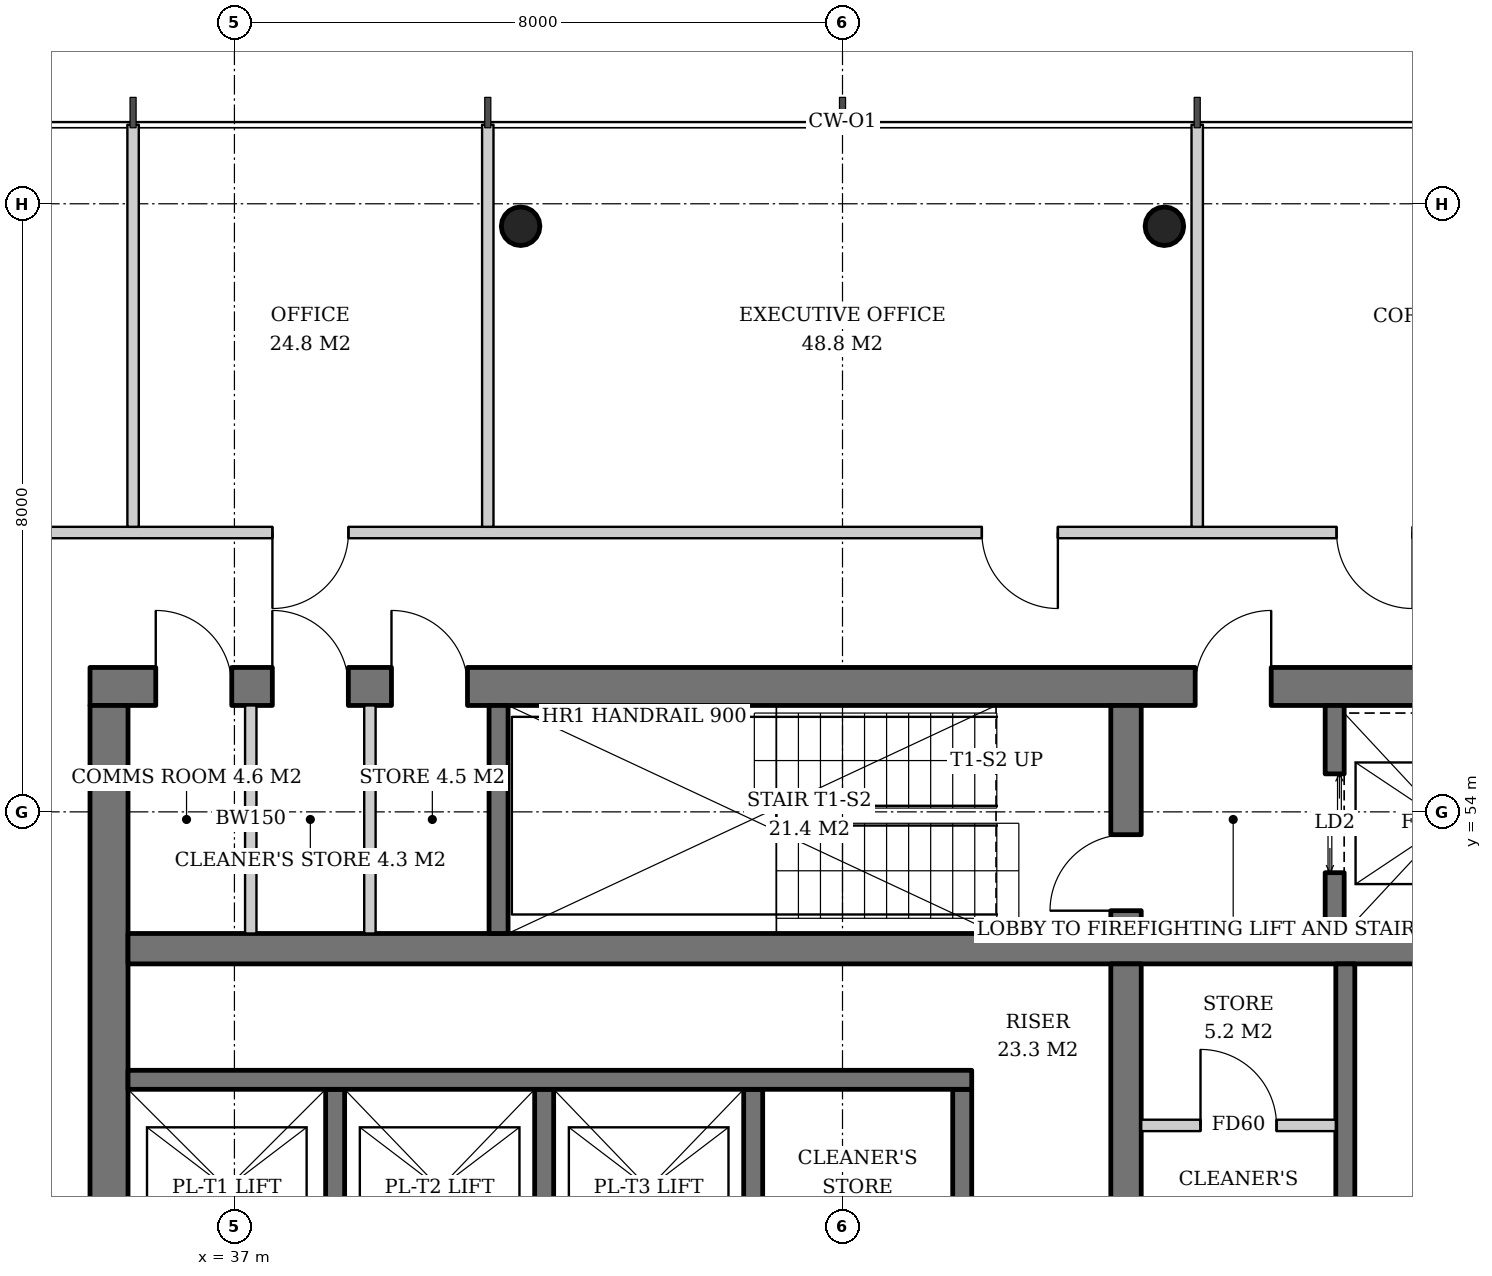
"""IFC4 building model, lengths in metres.
Left out: names, types, materials, properties, quantities, classifications, styles, units other than length and angle.
Written with IfcOpenShell. Run it as: python <this file> out.ifc"""

import sys

from ifc_helpers import new_model, si_unit, direction, frame, frame_2d, origin, origin_2d, place, context, subcontext, project, spatial, rectangle, hollow_circle, extrude, element, fill, save


model = new_model("IFC4")
c1 = context("Model", 3, precision=1e-05, world=origin(), true_north=direction((0.0, 1.0)))
c2 = subcontext(c1, "Body", "Model", "MODEL_VIEW")
j1 = project(units=[si_unit("LENGTHUNIT", "METRE"), si_unit("PLANEANGLEUNIT", "RADIAN")], contexts=[c1])
p1 = place(None, origin())
s1 = spatial("IfcSite", under=j1, at=p1, CompositionType="ELEMENT")
p2 = place(p1, origin())
s2 = spatial("IfcBuilding", under=s1, at=p2, CompositionType="ELEMENT")
p3 = place(p2, frame((0.0, 0.0, 279.4)))
s3 = spatial("IfcBuildingStorey", under=s2, at=p3, CompositionType="ELEMENT", Elevation=279.4)
for number, where, z_axis, x_axis in (
    (1, (49.248, 61.743, 0.0), (-0.011, -0.032, 0.999), (0.949, -0.316, 0.0)),
    (2, (40.752, 61.743, 0.0), (0.011, -0.032, 0.999), (0.949, 0.316, 0.0)),
):
    element("IfcColumn", number, at=place(p3, frame(where, z_axis=z_axis, x_axis=x_axis)), inside=s3, PredefinedType="COLUMN", context=c2, shape_type="SweptSolid", body=[
        extrude(hollow_circle(Radius=0.254, WallThickness=0.02, at=origin_2d()), origin(), (0.0, 0.0, 1.0), 3.802),
    ])
p4 = place(p3, frame((35.1, 55.65, 0.0), z_axis=(0.0, 0.0, 1.0), x_axis=(1.0, 0.0, 0.0)))
e3 = element("IfcWall", 3, at=p4, inside=s3, PredefinedType="SHEAR", context=c2, shape_type="SweptSolid", body=[
    extrude(rectangle(XDim=19.8, YDim=0.5, at=frame_2d((9.9, 0.0))), origin(), (0.0, 0.0, 1.0), 3.8),
])
p5 = place(p4, frame((14.54, 0.0, 0.0)))
e4 = element("IfcOpeningElement", 4, at=p5, cuts=e3, PredefinedType="OPENING", context=c2, shape_type="SweptSolid", body=[
    extrude(rectangle(XDim=1.0, YDim=2.1, at=frame_2d((0.5, 1.05))), frame((0.0, 0.26, 0.0), z_axis=(0.0, -1.0, 0.0), x_axis=(1.0, 0.0, 0.0)), (0.0, 0.0, 1.0), 0.52),
])
p6 = place(p4, frame((0.865, 0.0, 0.0)))
e5 = element("IfcOpeningElement", 5, at=p6, cuts=e3, PredefinedType="OPENING", context=c2, shape_type="SweptSolid", body=[
    extrude(rectangle(XDim=1.0, YDim=2.1, at=frame_2d((0.5, 1.05))), frame((0.0, 0.26, 0.0), z_axis=(0.0, -1.0, 0.0), x_axis=(1.0, 0.0, 0.0)), (0.0, 0.0, 1.0), 0.52),
])
p7 = place(p4, frame((2.399, 0.0, 0.0)))
e6 = element("IfcOpeningElement", 6, at=p7, cuts=e3, PredefinedType="OPENING", context=c2, shape_type="SweptSolid", body=[
    extrude(rectangle(XDim=1.0, YDim=2.1, at=frame_2d((0.5, 1.05))), frame((0.0, 0.26, 0.0), z_axis=(0.0, -1.0, 0.0), x_axis=(1.0, 0.0, 0.0)), (0.0, 0.0, 1.0), 0.52),
])
p8 = place(p4, frame((3.966, 0.0, 0.0)))
e7 = element("IfcOpeningElement", 7, at=p8, cuts=e3, PredefinedType="OPENING", context=c2, shape_type="SweptSolid", body=[
    extrude(rectangle(XDim=1.0, YDim=2.1, at=frame_2d((0.5, 1.05))), frame((0.0, 0.26, 0.0), z_axis=(0.0, -1.0, 0.0), x_axis=(1.0, 0.0, 0.0)), (0.0, 0.0, 1.0), 0.52),
])
p9 = place(p3, frame((35.35, 36.6, 0.0), z_axis=(0.0, 0.0, 1.0), x_axis=(0.0, 1.0, 0.0)))
e8 = element("IfcWall", 8, at=p9, inside=s3, PredefinedType="SHEAR", context=c2, shape_type="SweptSolid", body=[
    extrude(rectangle(XDim=18.8, YDim=0.5, at=frame_2d((9.4, 0.0))), origin(), (0.0, 0.0, 1.0), 3.8),
])
p10 = place(p9, frame((8.5, 0.0, 0.0)))
e9 = element("IfcOpeningElement", 9, at=p10, cuts=e8, PredefinedType="OPENING", context=c2, shape_type="SweptSolid", body=[
    extrude(rectangle(XDim=1.8, YDim=2.4, at=frame_2d((0.9, 1.2))), frame((0.0, 0.26, 0.0), z_axis=(0.0, -1.0, 0.0), x_axis=(1.0, 0.0, 0.0)), (0.0, 0.0, 1.0), 0.52),
])
p11 = place(p3, frame((35.6, 52.2, 0.0), z_axis=(0.0, 0.0, 1.0), x_axis=(1.0, 0.0, 0.0)))
e10 = element("IfcWall", 10, at=p11, inside=s3, PredefinedType="SHEAR", context=c2, shape_type="SweptSolid", body=[
    extrude(rectangle(XDim=18.8, YDim=0.4, at=frame_2d((9.4, 0.0))), origin(), (0.0, 0.0, 1.0), 3.8),
])
p12 = place(p3, frame((48.73, 40.0, 0.0), z_axis=(0.0, 0.0, 1.0), x_axis=(0.0, 1.0, 0.0)))
e11 = element("IfcWall", 11, at=p12, inside=s3, PredefinedType="SHEAR", context=c2, shape_type="SweptSolid", body=[
    extrude(rectangle(XDim=12.0, YDim=0.4, at=frame_2d((6.0, 0.0))), origin(), (0.0, 0.0, 1.0), 3.8),
])
p13 = place(p3, frame((48.73, 52.4, 0.0), z_axis=(0.0, 0.0, 1.0), x_axis=(0.0, 1.0, 0.0)))
e12 = element("IfcWall", 12, at=p13, inside=s3, PredefinedType="SHEAR", context=c2, shape_type="SweptSolid", body=[
    extrude(rectangle(XDim=3.0, YDim=0.4, at=frame_2d((1.5, 0.0))), origin(), (0.0, 0.0, 1.0), 3.8),
])
p14 = place(p13, frame((0.3, 0.0, 0.0)))
e13 = element("IfcOpeningElement", 13, at=p14, cuts=e12, PredefinedType="OPENING", context=c2, shape_type="SweptSolid", body=[
    extrude(rectangle(XDim=1.0, YDim=2.1, at=frame_2d((0.5, 1.05))), frame((0.0, 0.21, 0.0), z_axis=(0.0, -1.0, 0.0), x_axis=(1.0, 0.0, 0.0)), (0.0, 0.0, 1.0), 0.42),
])
p15 = place(p3, frame((40.475, 52.4, 0.0), z_axis=(0.0, 0.0, 1.0), x_axis=(0.0, 1.0, 0.0)))
e14 = element("IfcWall", 14, at=p15, inside=s3, PredefinedType="SHEAR", context=c2, shape_type="SweptSolid", body=[
    extrude(rectangle(XDim=3.0, YDim=0.25, at=frame_2d((1.5, 0.0))), origin(), (0.0, 0.0, 1.0), 3.8),
])
p16 = place(p3, frame((51.475, 52.4, 0.0), z_axis=(0.0, 0.0, 1.0), x_axis=(0.0, 1.0, 0.0)))
e15 = element("IfcWall", 15, at=p16, inside=s3, PredefinedType="SHEAR", context=c2, shape_type="SweptSolid", body=[
    extrude(rectangle(XDim=3.0, YDim=0.25, at=frame_2d((1.5, 0.0))), origin(), (0.0, 0.0, 1.0), 3.8),
])
p17 = place(p16, frame((0.8, 0.0, 0.0)))
e16 = element("IfcOpeningElement", 16, at=p17, cuts=e15, PredefinedType="OPENING", context=c2, shape_type="SweptSolid", body=[
    extrude(rectangle(XDim=1.3, YDim=2.2, at=frame_2d((0.65, 1.1))), frame((0.0, 0.135, 0.0), z_axis=(0.0, -1.0, 0.0), x_axis=(1.0, 0.0, 0.0)), (0.0, 0.0, 1.0), 0.27),
])
for number, where, z_axis, x_axis in (
    (17, (38.325, 47.75, 0.0), (0.0, 0.0, 1.0), (0.0, 1.0, 0.0)),
    (18, (41.075, 47.75, 0.0), (0.0, 0.0, 1.0), (0.0, 1.0, 0.0)),
    (19, (43.825, 47.75, 0.0), (0.0, 0.0, 1.0), (0.0, 1.0, 0.0)),
    (20, (46.575, 47.75, 0.0), (0.0, 0.0, 1.0), (0.0, 1.0, 0.0)),
):
    element("IfcWall", number, at=place(p3, frame(where, z_axis=z_axis, x_axis=x_axis)), inside=s3, PredefinedType="SHEAR", context=c2, shape_type="SweptSolid", body=[
        extrude(rectangle(XDim=2.6, YDim=0.25, at=frame_2d((1.3, 0.0))), origin(), (0.0, 0.0, 1.0), 3.8),
    ])
p18 = place(p3, frame((35.6, 50.475, 0.0), z_axis=(0.0, 0.0, 1.0), x_axis=(1.0, 0.0, 0.0)))
e21 = element("IfcWall", 21, at=p18, inside=s3, PredefinedType="SHEAR", context=c2, shape_type="SweptSolid", body=[
    extrude(rectangle(XDim=11.1, YDim=0.25, at=frame_2d((5.55, 0.0))), origin(), (0.0, 0.0, 1.0), 3.8),
])
p19 = place(p3, frame((51.615, 47.75, 0.0), z_axis=(0.0, 0.0, 1.0), x_axis=(0.0, 1.0, 0.0)))
e22 = element("IfcWall", 22, at=p19, inside=s3, PredefinedType="SHEAR", context=c2, shape_type="SweptSolid", body=[
    extrude(rectangle(XDim=4.25, YDim=0.25, at=frame_2d((2.125, 0.0))), origin(), (0.0, 0.0, 1.0), 3.8),
])
for number, where, z_axis, x_axis in (
    (23, (37.215, 52.4, 0.0), (0.0, 0.0, 1.0), (0.0, 1.0, 0.0)),
    (24, (38.782, 52.4, 0.0), (0.0, 0.0, 1.0), (0.0, 1.0, 0.0)),
):
    element("IfcWall", number, at=place(p3, frame(where, z_axis=z_axis, x_axis=x_axis)), inside=s3, PredefinedType="SOLIDWALL", context=c2, shape_type="SweptSolid", body=[
        extrude(rectangle(XDim=3.0, YDim=0.15, at=frame_2d((1.5, 0.0))), origin(), (0.0, 0.0, 1.0), 3.5),
    ])
p20 = place(p3, frame((48.93, 49.875, 0.0), z_axis=(0.0, 0.0, 1.0), x_axis=(1.0, 0.0, 0.0)))
e25 = element("IfcWall", 25, at=p20, inside=s3, PredefinedType="SOLIDWALL", context=c2, shape_type="SweptSolid", body=[
    extrude(rectangle(XDim=2.56, YDim=0.15, at=frame_2d((1.28, 0.0))), origin(), (0.0, 0.0, 1.0), 3.5),
])
p21 = place(p20, frame((0.78, 0.0, 0.0)))
e26 = element("IfcOpeningElement", 26, at=p21, cuts=e25, PredefinedType="OPENING", context=c2, shape_type="SweptSolid", body=[
    extrude(rectangle(XDim=1.0, YDim=2.1, at=frame_2d((0.5, 1.05))), frame((0.0, 0.085, 0.0), z_axis=(0.0, -1.0, 0.0), x_axis=(1.0, 0.0, 0.0)), (0.0, 0.0, 1.0), 0.17),
])
p22 = place(p3, frame((55.751, 57.675, 0.0), z_axis=(0.0, 0.0, 1.0), x_axis=(-1.0, 0.0, 0.0)))
e27 = element("IfcWall", 27, at=p22, inside=s3, PredefinedType="PARTITIONING", context=c2, shape_type="SweptSolid", body=[
    extrude(rectangle(XDim=21.503, YDim=0.15, at=frame_2d((10.751, 0.0))), origin(), (0.0, 0.0, 1.0), 2.747),
])
p23 = place(p22, frame((3.251, 0.0, 0.0)))
e28 = element("IfcOpeningElement", 28, at=p23, cuts=e27, PredefinedType="OPENING", context=c2, shape_type="SweptSolid", body=[
    extrude(rectangle(XDim=1.0, YDim=2.1, at=frame_2d((0.5, 1.05))), frame((0.0, 0.085, 0.0), z_axis=(0.0, -1.0, 0.0), x_axis=(1.0, 0.0, 0.0)), (0.0, 0.0, 1.0), 0.17),
])
p24 = place(p22, frame((7.918, 0.0, 0.0)))
e29 = element("IfcOpeningElement", 29, at=p24, cuts=e27, PredefinedType="OPENING", context=c2, shape_type="SweptSolid", body=[
    extrude(rectangle(XDim=1.0, YDim=2.1, at=frame_2d((0.5, 1.05))), frame((0.0, 0.085, 0.0), z_axis=(0.0, -1.0, 0.0), x_axis=(1.0, 0.0, 0.0)), (0.0, 0.0, 1.0), 0.17),
])
p25 = place(p22, frame((17.251, 0.0, 0.0)))
e30 = element("IfcOpeningElement", 30, at=p25, cuts=e27, PredefinedType="OPENING", context=c2, shape_type="SweptSolid", body=[
    extrude(rectangle(XDim=1.0, YDim=2.1, at=frame_2d((0.5, 1.05))), frame((0.0, 0.085, 0.0), z_axis=(0.0, -1.0, 0.0), x_axis=(1.0, 0.0, 0.0)), (0.0, 0.0, 1.0), 0.17),
])
for number, where, z_axis, x_axis in (
    (31, (49.667, 57.75, 0.0), (0.0, 0.0, 1.0), (0.0, 1.0, 0.0)),
    (32, (40.333, 57.75, 0.0), (0.0, 0.0, 1.0), (0.0, 1.0, 0.0)),
    (33, (35.667, 57.75, 0.0), (0.0, 0.0, 1.0), (0.0, 1.0, 0.0)),
):
    element("IfcWall", number, at=place(p3, frame(where, z_axis=z_axis, x_axis=x_axis)), inside=s3, PredefinedType="PARTITIONING", context=c2, shape_type="SweptSolid", body=[
        extrude(rectangle(XDim=5.29, YDim=0.15, at=frame_2d((2.645, 0.0))), origin(), (0.0, 0.0, 1.0), 3.0),
    ])
p26 = place(p17, origin())
e34 = element("IfcDoor", 34, at=p26, inside=s3, OperationType="DOUBLE_DOOR_SLIDING", PredefinedType="DOOR", context=c2, shape_type="SweptSolid", body=[
    extrude(rectangle(XDim=1.3, YDim=2.2, at=frame_2d((0.65, 1.1))), frame((0.0, 0.025, 0.0), z_axis=(0.0, -1.0, 0.0), x_axis=(1.0, 0.0, 0.0)), (0.0, 0.0, 1.0), 0.05),
])
fill(e16, e34)
p27 = place(p21, origin())
e35 = element("IfcDoor", 35, at=p27, inside=s3, OperationType="SINGLE_SWING_LEFT", PredefinedType="DOOR", context=c2, shape_type="SweptSolid", body=[
    extrude(rectangle(XDim=1.0, YDim=2.1, at=frame_2d((0.5, 1.05))), frame((0.0, 0.025, 0.0), z_axis=(0.0, -1.0, 0.0), x_axis=(1.0, 0.0, 0.0)), (0.0, 0.0, 1.0), 0.05),
])
fill(e26, e35)
p28 = place(p14, origin())
e36 = element("IfcDoor", 36, at=p28, inside=s3, OperationType="SINGLE_SWING_LEFT", PredefinedType="DOOR", context=c2, shape_type="SweptSolid", body=[
    extrude(rectangle(XDim=1.0, YDim=2.1, at=frame_2d((0.5, 1.05))), frame((0.0, 0.025, 0.0), z_axis=(0.0, -1.0, 0.0), x_axis=(1.0, 0.0, 0.0)), (0.0, 0.0, 1.0), 0.05),
])
fill(e13, e36)
p29 = place(p5, origin())
e37 = element("IfcDoor", 37, at=p29, inside=s3, OperationType="SINGLE_SWING_RIGHT", PredefinedType="DOOR", context=c2, shape_type="SweptSolid", body=[
    extrude(rectangle(XDim=1.0, YDim=2.1, at=frame_2d((0.5, 1.05))), frame((0.0, 0.025, 0.0), z_axis=(0.0, -1.0, 0.0), x_axis=(1.0, 0.0, 0.0)), (0.0, 0.0, 1.0), 0.05),
])
fill(e4, e37)
p30 = place(p6, origin())
e38 = element("IfcDoor", 38, at=p30, inside=s3, OperationType="SINGLE_SWING_LEFT", PredefinedType="DOOR", context=c2, shape_type="SweptSolid", body=[
    extrude(rectangle(XDim=1.0, YDim=2.1, at=frame_2d((0.5, 1.05))), frame((0.0, -0.19, 0.0), z_axis=(0.0, -1.0, 0.0), x_axis=(1.0, 0.0, 0.0)), (0.0, 0.0, 1.0), 0.05),
])
fill(e5, e38)
p31 = place(p7, origin())
e39 = element("IfcDoor", 39, at=p31, inside=s3, OperationType="SINGLE_SWING_LEFT", PredefinedType="DOOR", context=c2, shape_type="SweptSolid", body=[
    extrude(rectangle(XDim=1.0, YDim=2.1, at=frame_2d((0.5, 1.05))), frame((0.0, -0.19, 0.0), z_axis=(0.0, -1.0, 0.0), x_axis=(1.0, 0.0, 0.0)), (0.0, 0.0, 1.0), 0.05),
])
fill(e6, e39)
p32 = place(p8, origin())
e40 = element("IfcDoor", 40, at=p32, inside=s3, OperationType="SINGLE_SWING_LEFT", PredefinedType="DOOR", context=c2, shape_type="SweptSolid", body=[
    extrude(rectangle(XDim=1.0, YDim=2.1, at=frame_2d((0.5, 1.05))), frame((0.0, -0.19, 0.0), z_axis=(0.0, -1.0, 0.0), x_axis=(1.0, 0.0, 0.0)), (0.0, 0.0, 1.0), 0.05),
])
fill(e7, e40)
p33 = place(p23, origin())
e41 = element("IfcDoor", 41, at=p33, inside=s3, OperationType="SINGLE_SWING_LEFT", PredefinedType="DOOR", context=c2, shape_type="SweptSolid", body=[
    extrude(rectangle(XDim=1.0, YDim=2.1, at=frame_2d((0.5, 1.05))), frame((0.0, 0.025, 0.0), z_axis=(0.0, -1.0, 0.0), x_axis=(1.0, 0.0, 0.0)), (0.0, 0.0, 1.0), 0.05),
])
fill(e28, e41)
p34 = place(p24, origin())
e42 = element("IfcDoor", 42, at=p34, inside=s3, OperationType="SINGLE_SWING_LEFT", PredefinedType="DOOR", context=c2, shape_type="SweptSolid", body=[
    extrude(rectangle(XDim=1.0, YDim=2.1, at=frame_2d((0.5, 1.05))), frame((0.0, 0.025, 0.0), z_axis=(0.0, -1.0, 0.0), x_axis=(1.0, 0.0, 0.0)), (0.0, 0.0, 1.0), 0.05),
])
fill(e29, e42)
p35 = place(p25, origin())
e43 = element("IfcDoor", 43, at=p35, inside=s3, OperationType="SINGLE_SWING_RIGHT", PredefinedType="DOOR", context=c2, shape_type="SweptSolid", body=[
    extrude(rectangle(XDim=1.0, YDim=2.1, at=frame_2d((0.5, 1.05))), frame((0.0, 0.025, 0.0), z_axis=(0.0, -1.0, 0.0), x_axis=(1.0, 0.0, 0.0)), (0.0, 0.0, 1.0), 0.05),
])
fill(e30, e43)
save(model, sys.argv[1])
